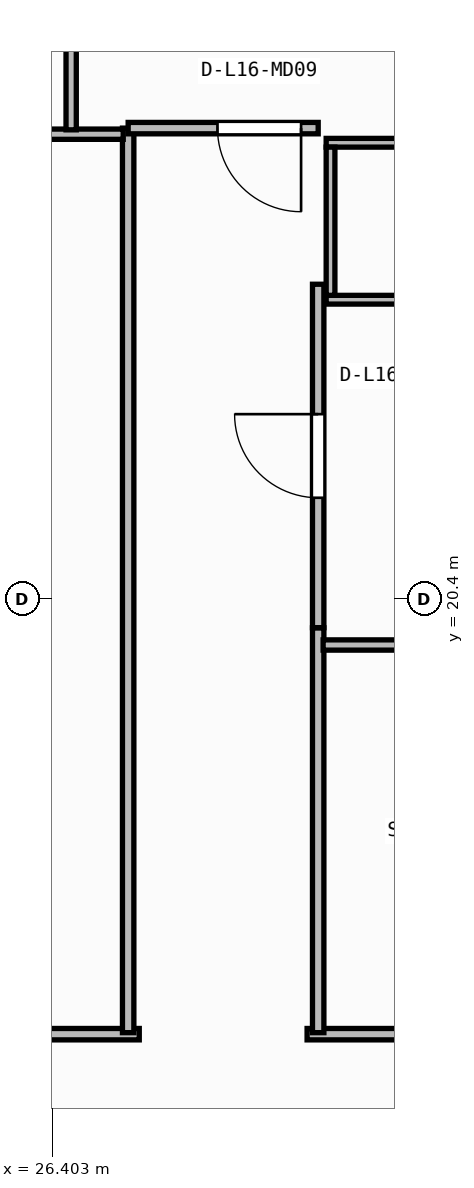
"""IFC4 building model, lengths in metres.
Left out: names, types, materials, properties, quantities, classifications, styles, units other than length and angle.
Written with IfcOpenShell. Run it as: python <this file> out.ifc"""

import sys

from ifc_helpers import new_model, si_unit, direction, frame, frame_2d, origin, place, context, subcontext, project, spatial, rectangle, extrude, element, fill, save


model = new_model("IFC4")
c1 = context("Model", 3, precision=1e-05, world=origin(), true_north=direction((0.0, 1.0)))
c2 = subcontext(c1, "Body", "Model", "MODEL_VIEW")
j1 = project(units=[si_unit("LENGTHUNIT", "METRE"), si_unit("PLANEANGLEUNIT", "RADIAN")], contexts=[c1])
p1 = place(None, origin())
s1 = spatial("IfcSite", under=j1, at=p1, CompositionType="ELEMENT")
p2 = place(p1, origin())
s2 = spatial("IfcBuilding", under=s1, at=p2, CompositionType="ELEMENT")
p3 = place(p2, frame((0.0, 0.0, 65.95)))
s3 = spatial("IfcBuildingStorey", under=s2, at=p3, CompositionType="ELEMENT", Elevation=65.95)
p4 = place(p3, frame((30.005, 24.343, 0.0), z_axis=(0.0, 0.0, 1.0), x_axis=(1.0, 0.0, 0.0)))
e1 = element("IfcWall", 1, at=p4, inside=s3, PredefinedType="PARTITIONING", context=c2, shape_type="SweptSolid", body=[
    extrude(rectangle(XDim=2.15, YDim=0.115, at=frame_2d((1.075, 0.0))), origin(), (0.0, 0.0, 1.0), 3.378),
])
p5 = place(p3, frame((30.005, 26.407, 0.0), z_axis=(0.0, 0.0, 1.0), x_axis=(1.0, 0.0, 0.0)))
e2 = element("IfcWall", 2, at=p5, inside=s3, PredefinedType="PARTITIONING", context=c2, shape_type="SweptSolid", body=[
    extrude(rectangle(XDim=2.15, YDim=0.115, at=frame_2d((1.075, 0.0))), origin(), (0.0, 0.0, 1.0), 3.71),
])
p6 = place(p3, frame((30.062, 24.4, 0.0), z_axis=(0.0, 0.0, 1.0), x_axis=(0.0, 1.0, 0.0)))
e3 = element("IfcWall", 3, at=p6, inside=s3, PredefinedType="PARTITIONING", context=c2, shape_type="SweptSolid", body=[
    extrude(rectangle(XDim=1.95, YDim=0.115, at=frame_2d((0.975, 0.0))), origin(), (0.0, 0.0, 1.0), 3.71),
])
p7 = place(p3, frame((27.546, 14.68, 0.0), z_axis=(0.0, 0.0, 1.0), x_axis=(-1.0, 0.0, 0.0)))
e4 = element("IfcWall", 4, at=p7, inside=s3, PredefinedType="PARTITIONING", context=c2, shape_type="SweptSolid", body=[
    extrude(rectangle(XDim=15.328, YDim=0.15, at=frame_2d((7.664, 0.0))), origin(), (0.0, 0.0, 1.0), 3.71),
])
p8 = place(p7, frame((7.114, 0.0, 0.0)))
e5 = element("IfcOpeningElement", 5, at=p8, cuts=e4, PredefinedType="OPENING", context=c2, shape_type="SweptSolid", body=[
    extrude(rectangle(XDim=1.1, YDim=2.1, at=frame_2d((0.55, 1.05))), frame((0.0, 0.085, 0.0), z_axis=(0.0, -1.0, 0.0), x_axis=(1.0, 0.0, 0.0)), (0.0, 0.0, 1.0), 0.17),
])
p9 = place(p3, frame((45.816, 14.68, 0.0), z_axis=(0.0, 0.0, 1.0), x_axis=(-1.0, 0.0, 0.0)))
e6 = element("IfcWall", 6, at=p9, inside=s3, PredefinedType="PARTITIONING", context=c2, shape_type="SweptSolid", body=[
    extrude(rectangle(XDim=16.062, YDim=0.15, at=frame_2d((8.031, 0.0))), origin(), (0.0, 0.0, 1.0), 3.71),
])
p10 = place(p9, frame((7.481, 0.0, 0.0)))
e7 = element("IfcOpeningElement", 7, at=p10, cuts=e6, PredefinedType="OPENING", context=c2, shape_type="SweptSolid", body=[
    extrude(rectangle(XDim=1.1, YDim=2.1, at=frame_2d((0.55, 1.05))), frame((0.0, 0.085, 0.0), z_axis=(0.0, -1.0, 0.0), x_axis=(1.0, 0.0, 0.0)), (0.0, 0.0, 1.0), 0.17),
])
p11 = place(p3, frame((27.4, 26.6, 0.0), z_axis=(0.0, 0.0, 1.0), x_axis=(0.0, -1.0, 0.0)))
e8 = element("IfcWall", 8, at=p11, inside=s3, PredefinedType="PARTITIONING", context=c2, shape_type="SweptSolid", body=[
    extrude(rectangle(XDim=11.9, YDim=0.15, at=frame_2d((5.95, 0.0))), origin(), (0.0, 0.0, 1.0), 3.71),
])
p12 = place(p3, frame((29.9, 14.7, 0.0), z_axis=(0.0, 0.0, 1.0), x_axis=(0.0, 1.0, 0.0)))
e9 = element("IfcWall", 9, at=p12, inside=s3, PredefinedType="PARTITIONING", context=c2, shape_type="SweptSolid", body=[
    extrude(rectangle(XDim=5.326, YDim=0.15, at=frame_2d((2.663, 0.0))), origin(), (0.0, 0.0, 1.0), 3.71),
])
p13 = place(p3, frame((29.9, 20.028, 0.0), z_axis=(0.0, 0.0, 1.0), x_axis=(0.0, 1.0, 0.0)))
e10 = element("IfcWall", 10, at=p13, inside=s3, PredefinedType="PARTITIONING", context=c2, shape_type="SweptSolid", body=[
    extrude(rectangle(XDim=4.518, YDim=0.15, at=frame_2d((2.259, 0.0))), origin(), (0.0, 0.0, 1.0), 3.71),
])
p14 = place(p13, frame((1.709, 0.0, 0.0)))
e11 = element("IfcOpeningElement", 11, at=p14, cuts=e10, PredefinedType="OPENING", context=c2, shape_type="SweptSolid", body=[
    extrude(rectangle(XDim=1.1, YDim=2.1, at=frame_2d((0.55, 1.05))), frame((0.0, 0.085, 0.0), z_axis=(0.0, -1.0, 0.0), x_axis=(1.0, 0.0, 0.0)), (0.0, 0.0, 1.0), 0.17),
])
p15 = place(p3, frame((29.9, 26.6, 0.0), z_axis=(0.0, 0.0, 1.0), x_axis=(-1.0, 0.0, 0.0)))
e12 = element("IfcWall", 12, at=p15, inside=s3, PredefinedType="PARTITIONING", context=c2, shape_type="SweptSolid", body=[
    extrude(rectangle(XDim=2.5, YDim=0.15, at=frame_2d((1.25, 0.0))), origin(), (0.0, 0.0, 1.0), 3.71),
])
p16 = place(p15, frame((0.225, 0.0, 0.0)))
e13 = element("IfcOpeningElement", 13, at=p16, cuts=e12, PredefinedType="OPENING", context=c2, shape_type="SweptSolid", body=[
    extrude(rectangle(XDim=1.1, YDim=2.1, at=frame_2d((0.55, 1.05))), frame((0.0, 0.085, 0.0), z_axis=(0.0, -1.0, 0.0), x_axis=(1.0, 0.0, 0.0)), (0.0, 0.0, 1.0), 0.17),
])
p17 = place(p3, frame((27.335, 26.52, 0.0), z_axis=(0.0, 0.0, 1.0), x_axis=(-1.0, 0.0, 0.0)))
e14 = element("IfcWall", 14, at=p17, inside=s3, PredefinedType="PARTITIONING", context=c2, shape_type="SweptSolid", body=[
    extrude(rectangle(XDim=6.118, YDim=0.135, at=frame_2d((3.059, 0.0))), origin(), (0.0, 0.0, 1.0), 3.71),
])
p18 = place(p17, frame((4.703, 0.0, 0.0)))
e15 = element("IfcOpeningElement", 15, at=p18, cuts=e14, PredefinedType="OPENING", context=c2, shape_type="SweptSolid", body=[
    extrude(rectangle(XDim=1.1, YDim=2.1, at=frame_2d((0.55, 1.05))), frame((0.0, 0.077, 0.0), z_axis=(0.0, -1.0, 0.0), x_axis=(1.0, 0.0, 0.0)), (0.0, 0.0, 1.0), 0.155),
])
p19 = place(p3, frame((34.775, 19.8, 0.0), z_axis=(0.0, 0.0, 1.0), x_axis=(-1.0, 0.0, 0.0)))
e16 = element("IfcWall", 16, at=p19, inside=s3, PredefinedType="PARTITIONING", context=c2, shape_type="SweptSolid", body=[
    extrude(rectangle(XDim=4.81, YDim=0.135, at=frame_2d((2.405, 0.0))), origin(), (0.0, 0.0, 1.0), 3.71),
])
p20 = place(p3, frame((26.65, 26.577, 0.0), z_axis=(0.0, 0.0, 1.0), x_axis=(0.0, 1.0, 0.0)))
e17 = element("IfcWall", 17, at=p20, inside=s3, PredefinedType="PARTITIONING", context=c2, shape_type="SweptSolid", body=[
    extrude(rectangle(XDim=4.893, YDim=0.135, at=frame_2d((2.447, 0.0))), origin(), (0.0, 0.0, 1.0), 3.71),
])
p21 = place(p14, origin())
e18 = element("IfcDoor", 18, at=p21, inside=s3, OperationType="SINGLE_SWING_RIGHT", PredefinedType="DOOR", context=c2, shape_type="SweptSolid", body=[
    extrude(rectangle(XDim=1.1, YDim=2.1, at=frame_2d((0.55, 1.05))), frame((0.0, 0.025, 0.0), z_axis=(0.0, -1.0, 0.0), x_axis=(1.0, 0.0, 0.0)), (0.0, 0.0, 1.0), 0.05),
])
fill(e11, e18)
p22 = place(p16, origin())
e19 = element("IfcDoor", 19, at=p22, inside=s3, OperationType="SINGLE_SWING_LEFT", PredefinedType="DOOR", context=c2, shape_type="SweptSolid", body=[
    extrude(rectangle(XDim=1.1, YDim=2.1, at=frame_2d((0.55, 1.05))), frame((0.0, 0.025, 0.0), z_axis=(0.0, -1.0, 0.0), x_axis=(1.0, 0.0, 0.0)), (0.0, 0.0, 1.0), 0.05),
])
fill(e13, e19)
save(model, sys.argv[1])
